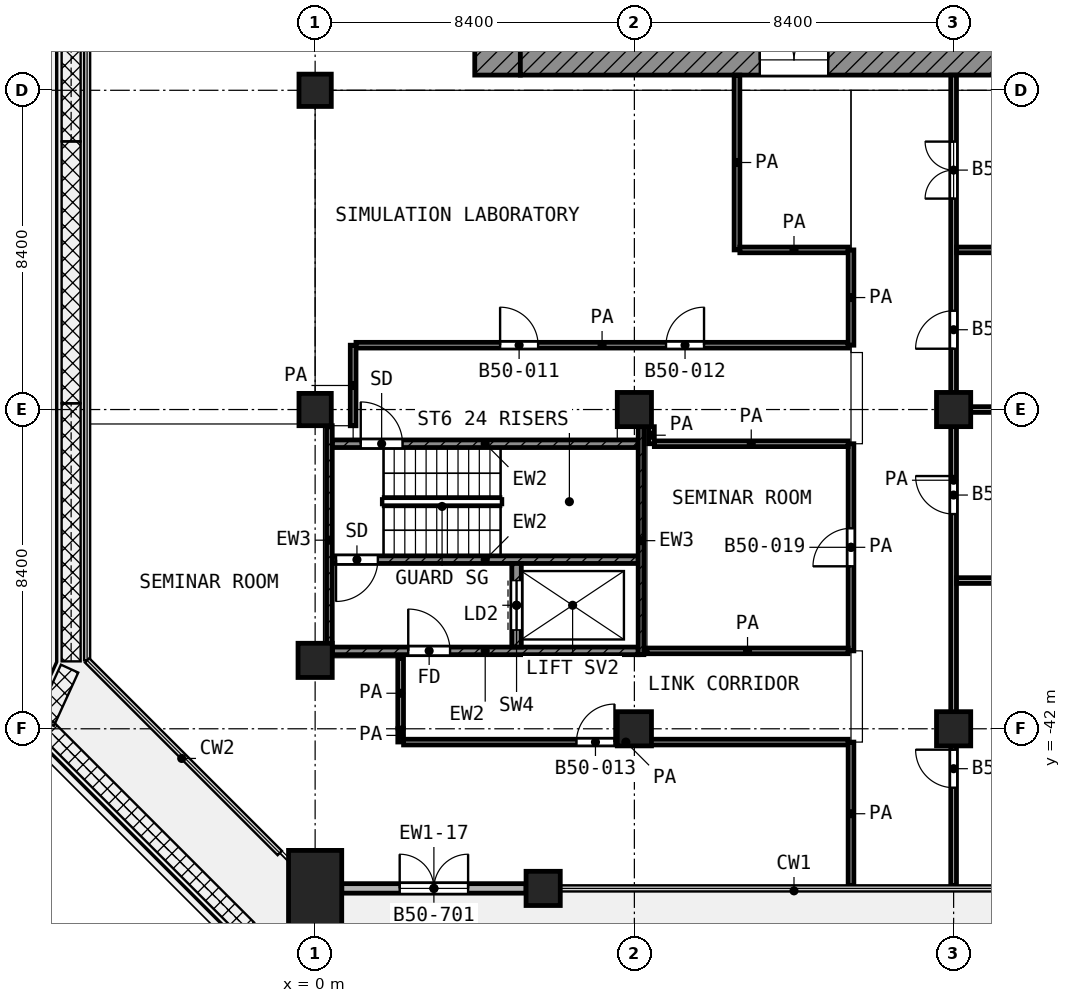
"""IFC4 building model, lengths in metres.
Left out: names, types, materials, properties, quantities, classifications, styles, units other than length and angle.
Written with IfcOpenShell. Run it as: python <this file> out.ifc"""

import sys

from ifc_helpers import new_model, si_unit, direction, frame, frame_2d, origin, origin_2d, place, context, subcontext, project, spatial, rectangle, extrude, element, fill, save


model = new_model("IFC4")
c1 = context("Model", 3, precision=1e-05, world=origin(), true_north=direction((0.0, 1.0)))
c2 = subcontext(c1, "Body", "Model", "MODEL_VIEW")
j1 = project(units=[si_unit("LENGTHUNIT", "METRE"), si_unit("PLANEANGLEUNIT", "RADIAN")], contexts=[c1])
p1 = place(None, origin())
s1 = spatial("IfcSite", under=j1, at=p1, CompositionType="ELEMENT")
p2 = place(p1, origin())
s2 = spatial("IfcBuilding", under=s1, at=p2, CompositionType="ELEMENT")
p3 = place(p2, frame((0.0, 0.0, 218.0)))
s3 = spatial("IfcBuildingStorey", under=s2, at=p3, CompositionType="ELEMENT", Elevation=218.0)
for number, where, z_axis, x_axis in (
    (1, (0.0, -25.2, 0.0), (0.0, 0.0, 1.0), (1.0, 0.0, 0.0)),
    (2, (0.0, -33.6, 0.0), (0.0, 0.0, 1.0), (1.0, 0.0, 0.0)),
):
    element("IfcColumn", number, at=place(p3, frame(where, z_axis=z_axis, x_axis=x_axis)), inside=s3, PredefinedType="COLUMN", context=c2, shape_type="SweptSolid", body=[
        extrude(rectangle(XDim=0.85, YDim=0.85, at=origin_2d()), origin(), (0.0, 0.0, 1.0), 4.2),
    ])
for number, where, z_axis, x_axis in (
    (3, (8.4, -33.6, 0.0), (0.0, 0.0, 1.0), (1.0, 0.0, 0.0)),
    (4, (16.8, -33.6, 0.0), (0.0, 0.0, 1.0), (1.0, 0.0, 0.0)),
    (5, (0.0, -40.2, 0.0), (0.0, 0.0, 1.0), (1.0, 0.0, 0.0)),
    (6, (8.4, -42.0, 0.0), (0.0, 0.0, 1.0), (1.0, 0.0, 0.0)),
    (7, (16.8, -42.0, 0.0), (0.0, 0.0, 1.0), (1.0, 0.0, 0.0)),
    (8, (6.0, -46.2, 0.0), (0.0, 0.0, 1.0), (1.0, 0.0, 0.0)),
):
    element("IfcColumn", number, at=place(p3, frame(where, z_axis=z_axis, x_axis=x_axis)), inside=s3, PredefinedType="COLUMN", context=c2, shape_type="SweptSolid", body=[
        extrude(rectangle(XDim=0.9, YDim=0.9, at=origin_2d()), origin(), (0.0, 0.0, 1.0), 4.2),
    ])
p4 = place(p3, frame((0.0, -46.2, 0.0), z_axis=(0.0, 0.0, 1.0), x_axis=(0.0, 1.0, 0.0)))
e9 = element("IfcColumn", 9, at=p4, inside=s3, PredefinedType="COLUMN", context=c2, shape_type="SweptSolid", body=[
    extrude(rectangle(XDim=2.0, YDim=1.4, at=origin_2d()), origin(), (0.0, 0.0, 1.0), 4.2),
])
p5 = place(p3, frame((0.7, -46.2, 0.0), z_axis=(0.0, 0.0, 1.0), x_axis=(1.0, 0.0, 0.0)))
e10 = element("IfcWall", 10, at=p5, inside=s3, PredefinedType="SOLIDWALL", context=c2, shape_type="SweptSolid", body=[
    extrude(rectangle(XDim=4.85, YDim=0.25, at=frame_2d((2.425, 0.0))), origin(), (0.0, 0.0, 1.0), 3.48),
])
p6 = place(p5, frame((1.525, 0.0, 0.0)))
e11 = element("IfcOpeningElement", 11, at=p6, cuts=e10, PredefinedType="OPENING", context=c2, shape_type="SweptSolid", body=[
    extrude(rectangle(XDim=1.8, YDim=2.1, at=frame_2d((0.9, 1.05))), frame((0.0, 0.135, 0.0), z_axis=(0.0, -1.0, 0.0), x_axis=(1.0, 0.0, 0.0)), (0.0, 0.0, 1.0), 0.27),
])
p7 = place(p3, frame((4.8, -24.8, 0.0), z_axis=(0.0, 0.0, 1.0), x_axis=(0.0, 1.0, 0.0)))
e12 = element("IfcWall", 12, at=p7, inside=s3, PredefinedType="SHEAR", context=c2, shape_type="SweptSolid", body=[
    extrude(rectangle(XDim=19.4, YDim=1.2, at=frame_2d((9.7, 0.0))), origin(), (0.0, 0.0, 1.0), 3.6),
])
p8 = place(p7, frame((11.25, 0.0, 0.0)))
e13 = element("IfcOpeningElement", 13, at=p8, cuts=e12, PredefinedType="OPENING", context=c2, shape_type="SweptSolid", body=[
    extrude(rectangle(XDim=1.1, YDim=2.1, at=frame_2d((0.55, 1.05))), frame((0.0, 0.61, 0.0), z_axis=(0.0, -1.0, 0.0), x_axis=(1.0, 0.0, 0.0)), (0.0, 0.0, 1.0), 1.22),
])
p9 = place(p7, frame((1.95, 0.0, 0.0)))
e14 = element("IfcOpeningElement", 14, at=p9, cuts=e12, PredefinedType="OPENING", context=c2, shape_type="SweptSolid", body=[
    extrude(rectangle(XDim=1.1, YDim=2.1, at=frame_2d((0.55, 1.05))), frame((0.0, 0.61, 0.0), z_axis=(0.0, -1.0, 0.0), x_axis=(1.0, 0.0, 0.0)), (0.0, 0.0, 1.0), 1.22),
])
p10 = place(p3, frame((5.4, -24.4, 0.0), z_axis=(0.0, 0.0, 1.0), x_axis=(1.0, 0.0, 0.0)))
e15 = element("IfcWall", 15, at=p10, inside=s3, PredefinedType="SHEAR", context=c2, shape_type="SweptSolid", body=[
    extrude(rectangle(XDim=18.6, YDim=0.8, at=frame_2d((9.3, 0.0))), origin(), (0.0, 0.0, 1.0), 3.6),
])
p11 = place(p10, frame((6.3, 0.0, 0.0)))
e16 = element("IfcOpeningElement", 16, at=p11, cuts=e15, PredefinedType="OPENING", context=c2, shape_type="SweptSolid", body=[
    extrude(rectangle(XDim=1.8, YDim=2.1, at=frame_2d((0.9, 1.05))), frame((0.0, 0.41, 0.0), z_axis=(0.0, -1.0, 0.0), x_axis=(1.0, 0.0, 0.0)), (0.0, 0.0, 1.0), 0.82),
])
p12 = place(p3, frame((0.375, -40.05, 0.0), z_axis=(0.0, 0.0, 1.0), x_axis=(0.0, 1.0, 0.0)))
e17 = element("IfcWall", 17, at=p12, inside=s3, PredefinedType="SHEAR", context=c2, shape_type="SweptSolid", body=[
    extrude(rectangle(XDim=6.025, YDim=0.15, at=frame_2d((3.013, 0.0))), origin(), (0.0, 0.0, 1.0), 3.6),
])
p13 = place(p3, frame((8.575, -40.05, 0.0), z_axis=(0.0, 0.0, 1.0), x_axis=(0.0, 1.0, 0.0)))
e18 = element("IfcWall", 18, at=p13, inside=s3, PredefinedType="SHEAR", context=c2, shape_type="SweptSolid", body=[
    extrude(rectangle(XDim=6.0, YDim=0.15, at=frame_2d((3.0, 0.0))), origin(), (0.0, 0.0, 1.0), 3.6),
])
p14 = place(p3, frame((0.45, -34.5, 0.0), z_axis=(0.0, 0.0, 1.0), x_axis=(1.0, 0.0, 0.0)))
e19 = element("IfcWall", 19, at=p14, inside=s3, PredefinedType="SHEAR", context=c2, shape_type="SweptSolid", body=[
    extrude(rectangle(XDim=8.05, YDim=0.2, at=frame_2d((4.025, 0.0))), origin(), (0.0, 0.0, 1.0), 3.6),
])
p15 = place(p14, frame((0.75, 0.0, 0.0)))
e20 = element("IfcOpeningElement", 20, at=p15, cuts=e19, PredefinedType="OPENING", context=c2, shape_type="SweptSolid", body=[
    extrude(rectangle(XDim=1.1, YDim=2.1, at=frame_2d((0.55, 1.05))), frame((0.0, 0.11, 0.0), z_axis=(0.0, -1.0, 0.0), x_axis=(1.0, 0.0, 0.0)), (0.0, 0.0, 1.0), 0.22),
])
p16 = place(p3, frame((0.45, -37.55, 0.0), z_axis=(0.0, 0.0, 1.0), x_axis=(1.0, 0.0, 0.0)))
e21 = element("IfcWall", 21, at=p16, inside=s3, PredefinedType="SHEAR", context=c2, shape_type="SweptSolid", body=[
    extrude(rectangle(XDim=8.05, YDim=0.2, at=frame_2d((4.025, 0.0))), origin(), (0.0, 0.0, 1.0), 3.6),
])
p17 = place(p16, frame((0.1, 0.0, 0.0)))
e22 = element("IfcOpeningElement", 22, at=p17, cuts=e21, PredefinedType="OPENING", context=c2, shape_type="SweptSolid", body=[
    extrude(rectangle(XDim=1.1, YDim=2.1, at=frame_2d((0.55, 1.05))), frame((0.0, 0.11, 0.0), z_axis=(0.0, -1.0, 0.0), x_axis=(1.0, 0.0, 0.0)), (0.0, 0.0, 1.0), 0.22),
])
p18 = place(p3, frame((0.45, -39.95, 0.0), z_axis=(0.0, 0.0, 1.0), x_axis=(1.0, 0.0, 0.0)))
e23 = element("IfcWall", 23, at=p18, inside=s3, PredefinedType="SHEAR", context=c2, shape_type="SweptSolid", body=[
    extrude(rectangle(XDim=8.05, YDim=0.2, at=frame_2d((4.025, 0.0))), origin(), (0.0, 0.0, 1.0), 3.6),
])
p19 = place(p18, frame((2.0, 0.0, 0.0)))
e24 = element("IfcOpeningElement", 24, at=p19, cuts=e23, PredefinedType="OPENING", context=c2, shape_type="SweptSolid", body=[
    extrude(rectangle(XDim=1.1, YDim=2.1, at=frame_2d((0.55, 1.05))), frame((0.0, 0.11, 0.0), z_axis=(0.0, -1.0, 0.0), x_axis=(1.0, 0.0, 0.0)), (0.0, 0.0, 1.0), 0.22),
])
p20 = place(p3, frame((5.3, -39.85, 0.0), z_axis=(0.0, 0.0, 1.0), x_axis=(0.0, 1.0, 0.0)))
e25 = element("IfcWall", 25, at=p20, inside=s3, PredefinedType="SHEAR", context=c2, shape_type="SweptSolid", body=[
    extrude(rectangle(XDim=2.2, YDim=0.25, at=frame_2d((1.1, 0.0))), origin(), (0.0, 0.0, 1.0), 3.6),
])
p21 = place(p20, frame((0.45, 0.0, 0.0)))
e26 = element("IfcOpeningElement", 26, at=p21, cuts=e25, PredefinedType="OPENING", context=c2, shape_type="SweptSolid", body=[
    extrude(rectangle(XDim=1.3, YDim=2.1, at=frame_2d((0.65, 1.05))), frame((0.0, 0.135, 0.0), z_axis=(0.0, -1.0, 0.0), x_axis=(1.0, 0.0, 0.0)), (0.0, 0.0, 1.0), 0.27),
])
p22 = place(p3, frame((2.327, -42.35, 0.0), z_axis=(0.0, 0.0, 1.0), x_axis=(1.0, 0.0, 0.0)))
e27 = element("IfcWall", 27, at=p22, inside=s3, PredefinedType="PARTITIONING", context=c2, shape_type="SweptSolid", body=[
    extrude(rectangle(XDim=11.698, YDim=0.15, at=frame_2d((5.849, 0.0))), origin(), (0.0, 0.0, 1.0), 3.6),
])
p23 = place(p22, frame((4.549, 0.0, 0.0)))
e28 = element("IfcOpeningElement", 28, at=p23, cuts=e27, PredefinedType="OPENING", context=c2, shape_type="SweptSolid", body=[
    extrude(rectangle(XDim=1.0, YDim=2.1, at=frame_2d((0.5, 1.05))), frame((0.0, 0.085, 0.0), z_axis=(0.0, -1.0, 0.0), x_axis=(1.0, 0.0, 0.0)), (0.0, 0.0, 1.0), 0.17),
])
p24 = place(p3, frame((8.73, -39.95, 0.0), z_axis=(0.0, 0.0, 1.0), x_axis=(1.0, 0.0, 0.0)))
e29 = element("IfcWall", 29, at=p24, inside=s3, PredefinedType="PARTITIONING", context=c2, shape_type="SweptSolid", body=[
    extrude(rectangle(XDim=5.295, YDim=0.15, at=frame_2d((2.647, 0.0))), origin(), (0.0, 0.0, 1.0), 3.6),
])
p25 = place(p3, frame((16.875, -38.1, 0.0), z_axis=(0.0, 0.0, 1.0), x_axis=(1.0, 0.0, 0.0)))
e30 = element("IfcWall", 30, at=p25, inside=s3, PredefinedType="PARTITIONING", context=c2, shape_type="SweptSolid", body=[
    extrude(rectangle(XDim=8.245, YDim=0.15, at=frame_2d((4.123, 0.0))), origin(), (0.0, 0.0, 1.0), 2.7),
])
p26 = place(p3, frame((8.925, -34.5, 0.0), z_axis=(0.0, 0.0, 1.0), x_axis=(1.0, 0.0, 0.0)))
e31 = element("IfcWall", 31, at=p26, inside=s3, PredefinedType="PARTITIONING", context=c2, shape_type="SweptSolid", body=[
    extrude(rectangle(XDim=5.1, YDim=0.15, at=frame_2d((2.55, 0.0))), origin(), (0.0, 0.0, 1.0), 3.6),
])
p27 = place(p3, frame((16.875, -33.6, 0.0), z_axis=(0.0, 0.0, 1.0), x_axis=(1.0, 0.0, 0.0)))
e32 = element("IfcWall", 32, at=p27, inside=s3, PredefinedType="PARTITIONING", context=c2, shape_type="SweptSolid", body=[
    extrude(rectangle(XDim=8.245, YDim=0.15, at=frame_2d((4.123, 0.0))), origin(), (0.0, 0.0, 1.0), 2.7),
])
p28 = place(p3, frame((1.075, -31.907, 0.0), z_axis=(0.0, 0.0, 1.0), x_axis=(1.0, 0.0, 0.0)))
e33 = element("IfcWall", 33, at=p28, inside=s3, PredefinedType="PARTITIONING", context=c2, shape_type="SweptSolid", body=[
    extrude(rectangle(XDim=12.95, YDim=0.15, at=frame_2d((6.475, 0.0))), origin(), (0.0, 0.0, 1.0), 3.6),
])
p29 = place(p28, frame((3.792, 0.0, 0.0)))
e34 = element("IfcOpeningElement", 34, at=p29, cuts=e33, PredefinedType="OPENING", context=c2, shape_type="SweptSolid", body=[
    extrude(rectangle(XDim=1.0, YDim=2.1, at=frame_2d((0.5, 1.05))), frame((0.0, 0.085, 0.0), z_axis=(0.0, -1.0, 0.0), x_axis=(1.0, 0.0, 0.0)), (0.0, 0.0, 1.0), 0.17),
])
p30 = place(p28, frame((8.158, 0.0, 0.0)))
e35 = element("IfcOpeningElement", 35, at=p30, cuts=e33, PredefinedType="OPENING", context=c2, shape_type="SweptSolid", body=[
    extrude(rectangle(XDim=1.0, YDim=2.1, at=frame_2d((0.5, 1.05))), frame((0.0, 0.085, 0.0), z_axis=(0.0, -1.0, 0.0), x_axis=(1.0, 0.0, 0.0)), (0.0, 0.0, 1.0), 0.17),
])
p31 = place(p3, frame((11.175, -29.4, 0.0), z_axis=(0.0, 0.0, 1.0), x_axis=(1.0, 0.0, 0.0)))
e36 = element("IfcWall", 36, at=p31, inside=s3, PredefinedType="PARTITIONING", context=c2, shape_type="SweptSolid", body=[
    extrude(rectangle(XDim=2.85, YDim=0.15, at=frame_2d((1.425, 0.0))), origin(), (0.0, 0.0, 1.0), 3.6),
])
p32 = place(p3, frame((16.875, -29.4, 0.0), z_axis=(0.0, 0.0, 1.0), x_axis=(1.0, 0.0, 0.0)))
e37 = element("IfcWall", 37, at=p32, inside=s3, PredefinedType="PARTITIONING", context=c2, shape_type="SweptSolid", body=[
    extrude(rectangle(XDim=8.25, YDim=0.15, at=frame_2d((4.125, 0.0))), origin(), (0.0, 0.0, 1.0), 3.6),
])
p33 = place(p3, frame((1.0, -34.027, 0.0), z_axis=(0.0, 0.0, 1.0), x_axis=(0.0, 1.0, 0.0)))
e38 = element("IfcWall", 38, at=p33, inside=s3, PredefinedType="PARTITIONING", context=c2, shape_type="SweptSolid", body=[
    extrude(rectangle(XDim=2.12, YDim=0.15, at=frame_2d((1.06, 0.0))), origin(), (0.0, 0.0, 1.0), 3.6),
])
p34 = place(p3, frame((2.25, -42.348, 0.0), z_axis=(0.0, 0.0, 1.0), x_axis=(0.0, 1.0, 0.0)))
e39 = element("IfcWall", 39, at=p34, inside=s3, PredefinedType="PARTITIONING", context=c2, shape_type="SweptSolid", body=[
    extrude(rectangle(XDim=0.348, YDim=0.15, at=frame_2d((0.174, 0.0))), origin(), (0.0, 0.0, 1.0), 3.6),
])
p35 = place(p3, frame((2.25, -41.98, 0.0), z_axis=(0.0, 0.0, 1.0), x_axis=(0.0, 1.0, 0.0)))
e40 = element("IfcWall", 40, at=p35, inside=s3, PredefinedType="PARTITIONING", context=c2, shape_type="SweptSolid", body=[
    extrude(rectangle(XDim=1.83, YDim=0.15, at=frame_2d((0.915, 0.0))), origin(), (0.0, 0.0, 1.0), 3.6),
])
p36 = place(p3, frame((8.85, -34.5, 0.0), z_axis=(0.0, 0.0, 1.0), x_axis=(0.0, 1.0, 0.0)))
e41 = element("IfcWall", 41, at=p36, inside=s3, PredefinedType="PARTITIONING", context=c2, shape_type="SweptSolid", body=[
    extrude(rectangle(XDim=0.449, YDim=0.15, at=frame_2d((0.225, 0.0))), origin(), (0.0, 0.0, 1.0), 3.6),
])
p37 = place(p3, frame((11.1, -29.4, 0.0), z_axis=(0.0, 0.0, 1.0), x_axis=(0.0, 1.0, 0.0)))
e42 = element("IfcWall", 42, at=p37, inside=s3, PredefinedType="PARTITIONING", context=c2, shape_type="SweptSolid", body=[
    extrude(rectangle(XDim=4.6, YDim=0.15, at=frame_2d((2.3, 0.0))), origin(), (0.0, 0.0, 1.0), 3.6),
])
p38 = place(p3, frame((14.1, -46.12, 0.0), z_axis=(0.0, 0.0, 1.0), x_axis=(0.0, 1.0, 0.0)))
e43 = element("IfcWall", 43, at=p38, inside=s3, PredefinedType="PARTITIONING", context=c2, shape_type="SweptSolid", body=[
    extrude(rectangle(XDim=3.77, YDim=0.15, at=frame_2d((1.885, 0.0))), origin(), (0.0, 0.0, 1.0), 3.6),
])
p39 = place(p3, frame((14.1, -39.95, 0.0), z_axis=(0.0, 0.0, 1.0), x_axis=(0.0, 1.0, 0.0)))
e44 = element("IfcWall", 44, at=p39, inside=s3, PredefinedType="PARTITIONING", context=c2, shape_type="SweptSolid", body=[
    extrude(rectangle(XDim=5.45, YDim=0.15, at=frame_2d((2.725, 0.0))), origin(), (0.0, 0.0, 1.0), 3.6),
])
p40 = place(p39, frame((2.225, 0.0, 0.0)))
e45 = element("IfcOpeningElement", 45, at=p40, cuts=e44, PredefinedType="OPENING", context=c2, shape_type="SweptSolid", body=[
    extrude(rectangle(XDim=1.0, YDim=2.1, at=frame_2d((0.5, 1.05))), frame((0.0, 0.085, 0.0), z_axis=(0.0, -1.0, 0.0), x_axis=(1.0, 0.0, 0.0)), (0.0, 0.0, 1.0), 0.17),
])
p41 = place(p3, frame((14.1, -31.907, 0.0), z_axis=(0.0, 0.0, 1.0), x_axis=(0.0, 1.0, 0.0)))
e46 = element("IfcWall", 46, at=p41, inside=s3, PredefinedType="PARTITIONING", context=c2, shape_type="SweptSolid", body=[
    extrude(rectangle(XDim=2.507, YDim=0.15, at=frame_2d((1.253, 0.0))), origin(), (0.0, 0.0, 1.0), 3.6),
])
p42 = place(p3, frame((16.8, -46.12, 0.0), z_axis=(0.0, 0.0, 1.0), x_axis=(0.0, 1.0, 0.0)))
e47 = element("IfcWall", 47, at=p42, inside=s3, PredefinedType="PARTITIONING", context=c2, shape_type="SweptSolid", body=[
    extrude(rectangle(XDim=21.32, YDim=0.15, at=frame_2d((10.66, 0.0))), origin(), (0.0, 0.0, 1.0), 3.6),
])
p43 = place(p42, frame((18.07, 0.0, 0.0)))
e48 = element("IfcOpeningElement", 48, at=p43, cuts=e47, PredefinedType="OPENING", context=c2, shape_type="SweptSolid", body=[
    extrude(rectangle(XDim=1.5, YDim=2.1, at=frame_2d((0.75, 1.05))), frame((0.0, 0.085, 0.0), z_axis=(0.0, -1.0, 0.0), x_axis=(1.0, 0.0, 0.0)), (0.0, 0.0, 1.0), 0.17),
])
p44 = place(p42, frame((14.12, 0.0, 0.0)))
e49 = element("IfcOpeningElement", 49, at=p44, cuts=e47, PredefinedType="OPENING", context=c2, shape_type="SweptSolid", body=[
    extrude(rectangle(XDim=1.0, YDim=2.1, at=frame_2d((0.5, 1.05))), frame((0.0, 0.085, 0.0), z_axis=(0.0, -1.0, 0.0), x_axis=(1.0, 0.0, 0.0)), (0.0, 0.0, 1.0), 0.17),
])
p45 = place(p42, frame((9.77, 0.0, 0.0)))
e50 = element("IfcOpeningElement", 50, at=p45, cuts=e47, PredefinedType="OPENING", context=c2, shape_type="SweptSolid", body=[
    extrude(rectangle(XDim=1.0, YDim=2.1, at=frame_2d((0.5, 1.05))), frame((0.0, 0.085, 0.0), z_axis=(0.0, -1.0, 0.0), x_axis=(1.0, 0.0, 0.0)), (0.0, 0.0, 1.0), 0.17),
])
p46 = place(p42, frame((2.57, 0.0, 0.0)))
e51 = element("IfcOpeningElement", 51, at=p46, cuts=e47, PredefinedType="OPENING", context=c2, shape_type="SweptSolid", body=[
    extrude(rectangle(XDim=1.0, YDim=2.1, at=frame_2d((0.5, 1.05))), frame((0.0, 0.085, 0.0), z_axis=(0.0, -1.0, 0.0), x_axis=(1.0, 0.0, 0.0)), (0.0, 0.0, 1.0), 0.17),
])
p47 = place(p6, origin())
e52 = element("IfcDoor", 52, at=p47, inside=s3, OperationType="DOUBLE_DOOR_SINGLE_SWING", PredefinedType="DOOR", context=c2, shape_type="SweptSolid", body=[
    extrude(rectangle(XDim=1.8, YDim=2.1, at=frame_2d((0.9, 1.05))), frame((0.0, 0.025, 0.0), z_axis=(0.0, -1.0, 0.0), x_axis=(1.0, 0.0, 0.0)), (0.0, 0.0, 1.0), 0.05),
])
fill(e11, e52)
p48 = place(p11, origin())
e53 = element("IfcDoor", 53, at=p48, inside=s3, OperationType="DOUBLE_DOOR_SINGLE_SWING", PredefinedType="DOOR", context=c2, shape_type="SweptSolid", body=[
    extrude(rectangle(XDim=1.8, YDim=2.1, at=frame_2d((0.9, 1.05))), frame((0.0, 0.025, 0.0), z_axis=(0.0, -1.0, 0.0), x_axis=(1.0, 0.0, 0.0)), (0.0, 0.0, 1.0), 0.05),
])
fill(e16, e53)
p49 = place(p15, origin())
e54 = element("IfcDoor", 54, at=p49, inside=s3, OperationType="SINGLE_SWING_LEFT", PredefinedType="DOOR", context=c2, shape_type="SweptSolid", body=[
    extrude(rectangle(XDim=1.1, YDim=2.1, at=frame_2d((0.55, 1.05))), frame((0.0, 0.025, 0.0), z_axis=(0.0, -1.0, 0.0), x_axis=(1.0, 0.0, 0.0)), (0.0, 0.0, 1.0), 0.05),
])
fill(e20, e54)
p50 = place(p17, frame((1.1, 0.0, 0.0), z_axis=(0.0, 0.0, 1.0), x_axis=(-1.0, 0.0, 0.0)))
e55 = element("IfcDoor", 55, at=p50, inside=s3, OperationType="SINGLE_SWING_LEFT", PredefinedType="DOOR", context=c2, shape_type="SweptSolid", body=[
    extrude(rectangle(XDim=1.1, YDim=2.1, at=frame_2d((0.55, 1.05))), frame((0.0, 0.025, 0.0), z_axis=(0.0, -1.0, 0.0), x_axis=(1.0, 0.0, 0.0)), (0.0, 0.0, 1.0), 0.05),
])
fill(e22, e55)
p51 = place(p21, origin())
e56 = element("IfcDoor", 56, at=p51, inside=s3, OperationType="DOUBLE_DOOR_SLIDING", PredefinedType="DOOR", context=c2, shape_type="SweptSolid", body=[
    extrude(rectangle(XDim=1.3, YDim=2.1, at=frame_2d((0.65, 1.05))), frame((0.0, 0.025, 0.0), z_axis=(0.0, -1.0, 0.0), x_axis=(1.0, 0.0, 0.0)), (0.0, 0.0, 1.0), 0.05),
])
fill(e26, e56)
p52 = place(p19, origin())
e57 = element("IfcDoor", 57, at=p52, inside=s3, OperationType="SINGLE_SWING_LEFT", PredefinedType="DOOR", context=c2, shape_type="SweptSolid", body=[
    extrude(rectangle(XDim=1.1, YDim=2.1, at=frame_2d((0.55, 1.05))), frame((0.0, 0.025, 0.0), z_axis=(0.0, -1.0, 0.0), x_axis=(1.0, 0.0, 0.0)), (0.0, 0.0, 1.0), 0.05),
])
fill(e24, e57)
p53 = place(p43, origin())
e58 = element("IfcDoor", 58, at=p53, inside=s3, OperationType="DOUBLE_DOOR_SINGLE_SWING", PredefinedType="DOOR", context=c2, shape_type="SweptSolid", body=[
    extrude(rectangle(XDim=1.5, YDim=2.1, at=frame_2d((0.75, 1.05))), frame((0.0, 0.025, 0.0), z_axis=(0.0, -1.0, 0.0), x_axis=(1.0, 0.0, 0.0)), (0.0, 0.0, 1.0), 0.05),
])
fill(e48, e58)
p54 = place(p29, origin())
e59 = element("IfcDoor", 59, at=p54, inside=s3, OperationType="SINGLE_SWING_LEFT", PredefinedType="DOOR", context=c2, shape_type="SweptSolid", body=[
    extrude(rectangle(XDim=1.0, YDim=2.1, at=frame_2d((0.5, 1.05))), frame((0.0, 0.025, 0.0), z_axis=(0.0, -1.0, 0.0), x_axis=(1.0, 0.0, 0.0)), (0.0, 0.0, 1.0), 0.05),
])
fill(e34, e59)
p55 = place(p30, origin())
e60 = element("IfcDoor", 60, at=p55, inside=s3, OperationType="SINGLE_SWING_RIGHT", PredefinedType="DOOR", context=c2, shape_type="SweptSolid", body=[
    extrude(rectangle(XDim=1.0, YDim=2.1, at=frame_2d((0.5, 1.05))), frame((0.0, 0.025, 0.0), z_axis=(0.0, -1.0, 0.0), x_axis=(1.0, 0.0, 0.0)), (0.0, 0.0, 1.0), 0.05),
])
fill(e35, e60)
p56 = place(p23, origin())
e61 = element("IfcDoor", 61, at=p56, inside=s3, OperationType="SINGLE_SWING_RIGHT", PredefinedType="DOOR", context=c2, shape_type="SweptSolid", body=[
    extrude(rectangle(XDim=1.0, YDim=2.1, at=frame_2d((0.5, 1.05))), frame((0.0, 0.025, 0.0), z_axis=(0.0, -1.0, 0.0), x_axis=(1.0, 0.0, 0.0)), (0.0, 0.0, 1.0), 0.05),
])
fill(e28, e61)
p57 = place(p44, origin())
e62 = element("IfcDoor", 62, at=p57, inside=s3, OperationType="SINGLE_SWING_LEFT", PredefinedType="DOOR", context=c2, shape_type="SweptSolid", body=[
    extrude(rectangle(XDim=1.0, YDim=2.1, at=frame_2d((0.5, 1.05))), frame((0.0, 0.025, 0.0), z_axis=(0.0, -1.0, 0.0), x_axis=(1.0, 0.0, 0.0)), (0.0, 0.0, 1.0), 0.05),
])
fill(e49, e62)
p58 = place(p45, origin())
e63 = element("IfcDoor", 63, at=p58, inside=s3, OperationType="SINGLE_SWING_RIGHT", PredefinedType="DOOR", context=c2, shape_type="SweptSolid", body=[
    extrude(rectangle(XDim=1.0, YDim=2.1, at=frame_2d((0.5, 1.05))), frame((0.0, 0.025, 0.0), z_axis=(0.0, -1.0, 0.0), x_axis=(1.0, 0.0, 0.0)), (0.0, 0.0, 1.0), 0.05),
])
fill(e50, e63)
p59 = place(p46, origin())
e64 = element("IfcDoor", 64, at=p59, inside=s3, OperationType="SINGLE_SWING_RIGHT", PredefinedType="DOOR", context=c2, shape_type="SweptSolid", body=[
    extrude(rectangle(XDim=1.0, YDim=2.1, at=frame_2d((0.5, 1.05))), frame((0.0, 0.025, 0.0), z_axis=(0.0, -1.0, 0.0), x_axis=(1.0, 0.0, 0.0)), (0.0, 0.0, 1.0), 0.05),
])
fill(e51, e64)
p60 = place(p40, origin())
e65 = element("IfcDoor", 65, at=p60, inside=s3, OperationType="SINGLE_SWING_LEFT", PredefinedType="DOOR", context=c2, shape_type="SweptSolid", body=[
    extrude(rectangle(XDim=1.0, YDim=2.1, at=frame_2d((0.5, 1.05))), frame((0.0, 0.025, 0.0), z_axis=(0.0, -1.0, 0.0), x_axis=(1.0, 0.0, 0.0)), (0.0, 0.0, 1.0), 0.05),
])
fill(e45, e65)
save(model, sys.argv[1])
